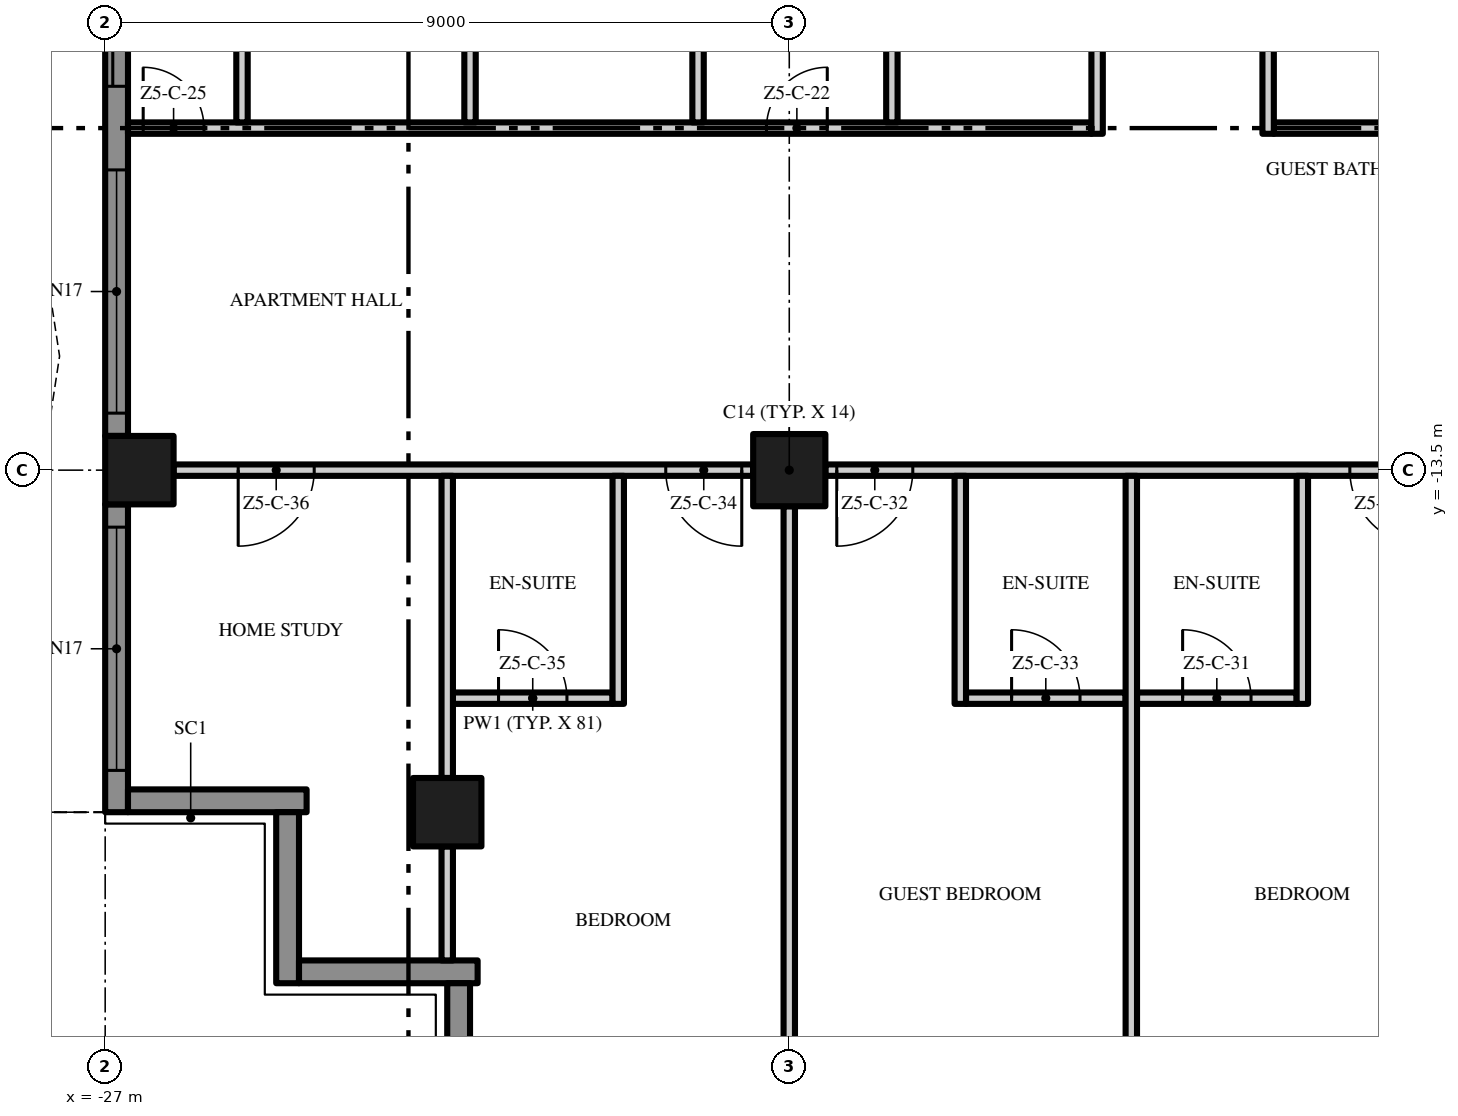
"""IFC4 building model, lengths in metres.
Left out: names, types, materials, properties, quantities, classifications, styles, units other than length and angle.
Written with IfcOpenShell. Run it as: python <this file> out.ifc"""

import sys

from ifc_helpers import new_model, si_unit, direction, frame, frame_2d, origin, origin_2d, place, context, subcontext, project, spatial, polyline, rectangle, outline, extrude, element, fill, save


model = new_model("IFC4")
c1 = context("Model", 3, precision=1e-05, world=origin(), true_north=direction((0.0, 1.0)))
c2 = subcontext(c1, "Body", "Model", "MODEL_VIEW")
j1 = project(units=[si_unit("LENGTHUNIT", "METRE"), si_unit("PLANEANGLEUNIT", "RADIAN")], contexts=[c1])
p1 = place(None, origin())
s1 = spatial("IfcSite", under=j1, at=p1, CompositionType="ELEMENT")
p2 = place(p1, origin())
s2 = spatial("IfcBuilding", under=s1, at=p2, CompositionType="ELEMENT")
p3 = place(p2, frame((0.0, 0.0, 265.4)))
s3 = spatial("IfcBuildingStorey", under=s2, at=p3, CompositionType="ELEMENT", Elevation=265.4)
p4 = place(p3, frame((-18.0, -13.5, 0.0), z_axis=(0.0, 0.0, 1.0), x_axis=(1.0, 0.0, 0.0)))
e1 = element("IfcColumn", 1, at=p4, inside=s3, PredefinedType="COLUMN", context=c2, shape_type="SweptSolid", body=[
    extrude(rectangle(XDim=0.95, YDim=0.95, at=origin_2d()), origin(), (0.0, 0.0, 1.0), 3.5),
])
for number, where, z_axis, x_axis in (
    (2, (-26.55, -13.5, 0.0), (0.0, 0.0, 1.0), (1.0, 0.0, 0.0)),
    (3, (-22.5, -18.0, 0.0), (0.0, 0.0, 1.0), (1.0, 0.0, 0.0)),
):
    element("IfcColumn", number, at=place(p3, frame(where, z_axis=z_axis, x_axis=x_axis)), inside=s3, PredefinedType="COLUMN", context=c2, shape_type="SweptSolid", body=[
        extrude(rectangle(XDim=0.9, YDim=0.9, at=origin_2d()), origin(), (0.0, 0.0, 1.0), 3.5),
    ])
p5 = place(p3, frame((-26.85, -13.05, 0.0), z_axis=(0.0, 0.0, 1.0), x_axis=(0.0, 1.0, 0.0)))
e4 = element("IfcWall", 4, at=p5, inside=s3, PredefinedType="SOLIDWALL", context=c2, shape_type="SweptSolid", body=[
    extrude(rectangle(XDim=8.1, YDim=0.3, at=frame_2d((4.05, 0.0))), origin(), (0.0, 0.0, 1.0), 3.5),
])
p6 = place(p5, frame((4.6, 0.0, 0.0)))
e5 = element("IfcOpeningElement", 5, at=p6, cuts=e4, PredefinedType="OPENING", context=c2, shape_type="SweptSolid", body=[
    extrude(rectangle(XDim=3.2, YDim=2.4, at=frame_2d((1.6, 1.2))), frame((0.0, 0.16, 0.0), z_axis=(0.0, -1.0, 0.0), x_axis=(1.0, 0.0, 0.0)), (0.0, 0.0, 1.0), 0.32),
])
p7 = place(p5, frame((0.3, 0.0, 0.45)))
e6 = element("IfcOpeningElement", 6, at=p7, cuts=e4, PredefinedType="OPENING", context=c2, shape_type="SweptSolid", body=[
    extrude(rectangle(XDim=3.2, YDim=2.65, at=frame_2d((1.6, 1.325))), frame((0.0, 0.16, 0.0), z_axis=(0.0, -1.0, 0.0), x_axis=(1.0, 0.0, 0.0)), (0.0, 0.0, 1.0), 0.32),
])
p8 = place(p3, frame((-26.85, -18.0, 0.0), z_axis=(0.0, 0.0, 1.0), x_axis=(0.0, 1.0, 0.0)))
e7 = element("IfcWall", 7, at=p8, inside=s3, PredefinedType="SOLIDWALL", context=c2, shape_type="SweptSolid", body=[
    extrude(rectangle(XDim=4.05, YDim=0.3, at=frame_2d((2.025, 0.0))), origin(), (0.0, 0.0, 1.0), 3.5),
])
p9 = place(p8, frame((0.55, 0.0, 0.45)))
e8 = element("IfcOpeningElement", 8, at=p9, cuts=e7, PredefinedType="OPENING", context=c2, shape_type="SweptSolid", body=[
    extrude(rectangle(XDim=3.2, YDim=2.65, at=frame_2d((1.6, 1.325))), frame((0.0, 0.16, 0.0), z_axis=(0.0, -1.0, 0.0), x_axis=(1.0, 0.0, 0.0)), (0.0, 0.0, 1.0), 0.32),
])
p10 = place(p3, frame((-24.35, -17.85, 0.0), z_axis=(0.0, 0.0, 1.0), x_axis=(-1.0, 0.0, 0.0)))
e9 = element("IfcWall", 9, at=p10, inside=s3, PredefinedType="SOLIDWALL", context=c2, shape_type="SweptSolid", body=[
    extrude(rectangle(XDim=2.35, YDim=0.3, at=frame_2d((1.175, 0.0))), origin(), (0.0, 0.0, 1.0), 3.5),
])
p11 = place(p3, frame((-24.6, -20.25, 0.0), z_axis=(0.0, 0.0, 1.0), x_axis=(0.0, 1.0, 0.0)))
e10 = element("IfcWall", 10, at=p11, inside=s3, PredefinedType="SOLIDWALL", context=c2, shape_type="SweptSolid", body=[
    extrude(rectangle(XDim=2.25, YDim=0.3, at=frame_2d((1.125, 0.0))), origin(), (0.0, 0.0, 1.0), 3.5),
])
p12 = place(p3, frame((-22.1, -20.1, 0.0), z_axis=(0.0, 0.0, 1.0), x_axis=(-1.0, 0.0, 0.0)))
e11 = element("IfcWall", 11, at=p12, inside=s3, PredefinedType="SOLIDWALL", context=c2, shape_type="SweptSolid", body=[
    extrude(rectangle(XDim=2.35, YDim=0.3, at=frame_2d((1.175, 0.0))), origin(), (0.0, 0.0, 1.0), 3.5),
])
p13 = place(p3, frame((-22.35, -22.5, 0.0), z_axis=(0.0, 0.0, 1.0), x_axis=(0.0, 1.0, 0.0)))
e12 = element("IfcWall", 12, at=p13, inside=s3, PredefinedType="SOLIDWALL", context=c2, shape_type="SweptSolid", body=[
    extrude(rectangle(XDim=2.25, YDim=0.3, at=frame_2d((1.125, 0.0))), origin(), (0.0, 0.0, 1.0), 3.5),
])
p14 = place(p3, origin())
e13 = element("IfcWall", 13, at=p14, inside=s3, PredefinedType="USERDEFINED", context=c2, shape_type="SweptSolid", body=[
    extrude(outline(polyline([(-27.6, 18.0), (-27.829, 16.5), (-28.429, 15.0), (-29.171, 13.5), (-29.771, 12.0), (-30.0, 10.5), (-29.771, 9.0), (-29.171, 7.5), (-28.429, 6.0), (-27.829, 4.5), (-27.6, 3.0), (-27.829, 1.5), (-28.429, 0.0), (-29.171, -1.5), (-29.771, -3.0), (-30.0, -4.5), (-29.771, -6.0), (-29.171, -7.5), (-28.429, -9.0), (-27.829, -10.5), (-27.6, -12.0), (-27.829, -13.5), (-28.429, -15.0), (-29.171, -16.5), (-29.771, -18.0), (-29.539, -18.093), (-28.942, -16.602), (-28.201, -15.102), (-27.586, -13.566), (-27.347, -12.0), (-27.586, -10.434), (-28.201, -8.898), (-28.942, -7.398), (-29.528, -5.934), (-29.747, -4.5), (-29.528, -3.066), (-28.942, -1.602), (-28.201, -0.102), (-27.586, 1.434), (-27.347, 3.0), (-27.586, 4.566), (-28.201, 6.102), (-28.942, 7.602), (-29.528, 9.066), (-29.747, 10.5), (-29.528, 11.934), (-28.942, 13.398), (-28.201, 14.898), (-27.586, 16.434), (-27.353, 17.962), (-27.6, 18.0)])), origin(), (0.0, 0.0, 1.0), 0.9),
])
p15 = place(p3, frame((-22.425, -16.5, 0.0), z_axis=(0.0, 0.0, 1.0), x_axis=(1.0, 0.0, 0.0)))
e14 = element("IfcWall", 14, at=p15, inside=s3, PredefinedType="PARTITIONING", context=c2, shape_type="SweptSolid", body=[
    extrude(rectangle(XDim=2.1, YDim=0.15, at=frame_2d((1.05, 0.0))), origin(), (0.0, 0.0, 1.0), 3.5),
])
p16 = place(p15, frame((0.6, 0.0, 0.0)))
e15 = element("IfcOpeningElement", 15, at=p16, cuts=e14, PredefinedType="OPENING", context=c2, shape_type="SweptSolid", body=[
    extrude(rectangle(XDim=0.9, YDim=2.1, at=frame_2d((0.45, 1.05))), frame((0.0, 0.085, 0.0), z_axis=(0.0, -1.0, 0.0), x_axis=(1.0, 0.0, 0.0)), (0.0, 0.0, 1.0), 0.17),
])
p17 = place(p3, frame((-15.675, -16.5, 0.0), z_axis=(0.0, 0.0, 1.0), x_axis=(1.0, 0.0, 0.0)))
e16 = element("IfcWall", 16, at=p17, inside=s3, PredefinedType="PARTITIONING", context=c2, shape_type="SweptSolid", body=[
    extrude(rectangle(XDim=2.1, YDim=0.15, at=frame_2d((1.05, 0.0))), origin(), (0.0, 0.0, 1.0), 3.5),
])
p18 = place(p17, frame((0.6, 0.0, 0.0)))
e17 = element("IfcOpeningElement", 17, at=p18, cuts=e16, PredefinedType="OPENING", context=c2, shape_type="SweptSolid", body=[
    extrude(rectangle(XDim=0.9, YDim=2.1, at=frame_2d((0.45, 1.05))), frame((0.0, 0.085, 0.0), z_axis=(0.0, -1.0, 0.0), x_axis=(1.0, 0.0, 0.0)), (0.0, 0.0, 1.0), 0.17),
])
p19 = place(p3, frame((-13.425, -16.5, 0.0), z_axis=(0.0, 0.0, 1.0), x_axis=(1.0, 0.0, 0.0)))
e18 = element("IfcWall", 18, at=p19, inside=s3, PredefinedType="PARTITIONING", context=c2, shape_type="SweptSolid", body=[
    extrude(rectangle(XDim=2.1, YDim=0.15, at=frame_2d((1.05, 0.0))), origin(), (0.0, 0.0, 1.0), 3.5),
])
p20 = place(p19, frame((0.6, 0.0, 0.0)))
e19 = element("IfcOpeningElement", 19, at=p20, cuts=e18, PredefinedType="OPENING", context=c2, shape_type="SweptSolid", body=[
    extrude(rectangle(XDim=0.9, YDim=2.1, at=frame_2d((0.45, 1.05))), frame((0.0, 0.085, 0.0), z_axis=(0.0, -1.0, 0.0), x_axis=(1.0, 0.0, 0.0)), (0.0, 0.0, 1.0), 0.17),
])
p21 = place(p3, frame((-18.475, -13.5, 0.0), z_axis=(0.0, 0.0, 1.0), x_axis=(-1.0, 0.0, 0.0)))
e20 = element("IfcWall", 20, at=p21, inside=s3, PredefinedType="PARTITIONING", context=c2, shape_type="SweptSolid", body=[
    extrude(rectangle(XDim=7.625, YDim=0.15, at=frame_2d((3.812, 0.0))), origin(), (0.0, 0.0, 1.0), 3.5),
])
p22 = place(p21, frame((0.15, 0.0, 0.0)))
e21 = element("IfcOpeningElement", 21, at=p22, cuts=e20, PredefinedType="OPENING", context=c2, shape_type="SweptSolid", body=[
    extrude(rectangle(XDim=1.0, YDim=2.4, at=frame_2d((0.5, 1.2))), frame((0.0, 0.085, 0.0), z_axis=(0.0, -1.0, 0.0), x_axis=(1.0, 0.0, 0.0)), (0.0, 0.0, 1.0), 0.17),
])
p23 = place(p21, frame((5.775, 0.0, 0.0)))
e22 = element("IfcOpeningElement", 22, at=p23, cuts=e20, PredefinedType="OPENING", context=c2, shape_type="SweptSolid", body=[
    extrude(rectangle(XDim=1.0, YDim=2.4, at=frame_2d((0.5, 1.2))), frame((0.0, 0.085, 0.0), z_axis=(0.0, -1.0, 0.0), x_axis=(1.0, 0.0, 0.0)), (0.0, 0.0, 1.0), 0.17),
])
p24 = place(p3, frame((-9.475, -13.5, 0.0), z_axis=(0.0, 0.0, 1.0), x_axis=(-1.0, 0.0, 0.0)))
e23 = element("IfcWall", 23, at=p24, inside=s3, PredefinedType="PARTITIONING", context=c2, shape_type="SweptSolid", body=[
    extrude(rectangle(XDim=8.05, YDim=0.15, at=frame_2d((4.025, 0.0))), origin(), (0.0, 0.0, 1.0), 3.5),
])
p25 = place(p24, frame((0.15, 0.0, 0.0)))
e24 = element("IfcOpeningElement", 24, at=p25, cuts=e23, PredefinedType="OPENING", context=c2, shape_type="SweptSolid", body=[
    extrude(rectangle(XDim=1.0, YDim=2.4, at=frame_2d((0.5, 1.2))), frame((0.0, 0.085, 0.0), z_axis=(0.0, -1.0, 0.0), x_axis=(1.0, 0.0, 0.0)), (0.0, 0.0, 1.0), 0.17),
])
p26 = place(p24, frame((6.9, 0.0, 0.0)))
e25 = element("IfcOpeningElement", 25, at=p26, cuts=e23, PredefinedType="OPENING", context=c2, shape_type="SweptSolid", body=[
    extrude(rectangle(XDim=1.0, YDim=2.4, at=frame_2d((0.5, 1.2))), frame((0.0, 0.085, 0.0), z_axis=(0.0, -1.0, 0.0), x_axis=(1.0, 0.0, 0.0)), (0.0, 0.0, 1.0), 0.17),
])
p27 = place(p3, frame((-26.7, -9.0, 0.0), z_axis=(0.0, 0.0, 1.0), x_axis=(1.0, 0.0, 0.0)))
e26 = element("IfcWall", 26, at=p27, inside=s3, PredefinedType="PARTITIONING", context=c2, shape_type="SweptSolid", body=[
    extrude(rectangle(XDim=12.675, YDim=0.15, at=frame_2d((6.338, 0.0))), origin(), (0.0, 0.0, 1.0), 3.5),
])
p28 = place(p27, frame((8.4, 0.0, 0.0)))
e27 = element("IfcOpeningElement", 27, at=p28, cuts=e26, PredefinedType="OPENING", context=c2, shape_type="SweptSolid", body=[
    extrude(rectangle(XDim=0.8, YDim=2.0, at=frame_2d((0.4, 1.0))), frame((0.0, 0.085, 0.0), z_axis=(0.0, -1.0, 0.0), x_axis=(1.0, 0.0, 0.0)), (0.0, 0.0, 1.0), 0.17),
])
p29 = place(p27, frame((0.2, 0.0, 0.0)))
e28 = element("IfcOpeningElement", 28, at=p29, cuts=e26, PredefinedType="OPENING", context=c2, shape_type="SweptSolid", body=[
    extrude(rectangle(XDim=0.8, YDim=2.0, at=frame_2d((0.4, 1.0))), frame((0.0, 0.085, 0.0), z_axis=(0.0, -1.0, 0.0), x_axis=(1.0, 0.0, 0.0)), (0.0, 0.0, 1.0), 0.17),
])
p30 = place(p3, frame((-11.625, -9.0, 0.0), z_axis=(0.0, 0.0, 1.0), x_axis=(1.0, 0.0, 0.0)))
e29 = element("IfcWall", 29, at=p30, inside=s3, PredefinedType="PARTITIONING", context=c2, shape_type="SweptSolid", body=[
    extrude(rectangle(XDim=16.025, YDim=0.15, at=frame_2d((8.012, 0.0))), origin(), (0.0, 0.0, 1.0), 3.5),
])
p31 = place(p30, frame((4.675, 0.0, 0.0)))
e30 = element("IfcOpeningElement", 30, at=p31, cuts=e29, PredefinedType="OPENING", context=c2, shape_type="SweptSolid", body=[
    extrude(rectangle(XDim=1.0, YDim=2.4, at=frame_2d((0.5, 1.2))), frame((0.0, 0.085, 0.0), z_axis=(0.0, -1.0, 0.0), x_axis=(1.0, 0.0, 0.0)), (0.0, 0.0, 1.0), 0.17),
])
p32 = place(p3, frame((-25.2, -8.925, 0.0), z_axis=(0.0, 0.0, 1.0), x_axis=(0.0, 1.0, 0.0)))
e31 = element("IfcWall", 31, at=p32, inside=s3, PredefinedType="PARTITIONING", context=c2, shape_type="SweptSolid", body=[
    extrude(rectangle(XDim=4.35, YDim=0.15, at=frame_2d((2.175, 0.0))), origin(), (0.0, 0.0, 1.0), 3.5),
])
p33 = place(p3, frame((-22.5, -19.95, 0.0), z_axis=(0.0, 0.0, 1.0), x_axis=(0.0, 1.0, 0.0)))
e32 = element("IfcWall", 32, at=p33, inside=s3, PredefinedType="PARTITIONING", context=c2, shape_type="SweptSolid", body=[
    extrude(rectangle(XDim=1.5, YDim=0.15, at=frame_2d((0.75, 0.0))), origin(), (0.0, 0.0, 1.0), 3.5),
])
p34 = place(p3, frame((-22.5, -17.55, 0.0), z_axis=(0.0, 0.0, 1.0), x_axis=(0.0, 1.0, 0.0)))
e33 = element("IfcWall", 33, at=p34, inside=s3, PredefinedType="PARTITIONING", context=c2, shape_type="SweptSolid", body=[
    extrude(rectangle(XDim=3.975, YDim=0.15, at=frame_2d((1.988, 0.0))), origin(), (0.0, 0.0, 1.0), 3.5),
])
p35 = place(p3, frame((-22.2, -8.925, 0.0), z_axis=(0.0, 0.0, 1.0), x_axis=(0.0, 1.0, 0.0)))
e34 = element("IfcWall", 34, at=p35, inside=s3, PredefinedType="PARTITIONING", context=c2, shape_type="SweptSolid", body=[
    extrude(rectangle(XDim=4.35, YDim=0.15, at=frame_2d((2.175, 0.0))), origin(), (0.0, 0.0, 1.0), 3.5),
])
p36 = place(p3, frame((-20.25, -16.575, 0.0), z_axis=(0.0, 0.0, 1.0), x_axis=(0.0, 1.0, 0.0)))
e35 = element("IfcWall", 35, at=p36, inside=s3, PredefinedType="PARTITIONING", context=c2, shape_type="SweptSolid", body=[
    extrude(rectangle(XDim=3.0, YDim=0.15, at=frame_2d((1.5, 0.0))), origin(), (0.0, 0.0, 1.0), 3.5),
])
p37 = place(p3, frame((-19.2, -8.925, 0.0), z_axis=(0.0, 0.0, 1.0), x_axis=(0.0, 1.0, 0.0)))
e36 = element("IfcWall", 36, at=p37, inside=s3, PredefinedType="PARTITIONING", context=c2, shape_type="SweptSolid", body=[
    extrude(rectangle(XDim=4.35, YDim=0.15, at=frame_2d((2.175, 0.0))), origin(), (0.0, 0.0, 1.0), 3.5),
])
p38 = place(p3, frame((-18.0, -21.6, 0.0), z_axis=(0.0, 0.0, 1.0), x_axis=(0.0, 1.0, 0.0)))
e37 = element("IfcWall", 37, at=p38, inside=s3, PredefinedType="PARTITIONING", context=c2, shape_type="SweptSolid", body=[
    extrude(rectangle(XDim=7.625, YDim=0.15, at=frame_2d((3.812, 0.0))), origin(), (0.0, 0.0, 1.0), 3.5),
])
p39 = place(p3, frame((-16.65, -8.925, 0.0), z_axis=(0.0, 0.0, 1.0), x_axis=(0.0, 1.0, 0.0)))
e38 = element("IfcWall", 38, at=p39, inside=s3, PredefinedType="PARTITIONING", context=c2, shape_type="SweptSolid", body=[
    extrude(rectangle(XDim=4.35, YDim=0.15, at=frame_2d((2.175, 0.0))), origin(), (0.0, 0.0, 1.0), 3.5),
])
p40 = place(p3, frame((-15.75, -16.575, 0.0), z_axis=(0.0, 0.0, 1.0), x_axis=(0.0, 1.0, 0.0)))
e39 = element("IfcWall", 39, at=p40, inside=s3, PredefinedType="PARTITIONING", context=c2, shape_type="SweptSolid", body=[
    extrude(rectangle(XDim=3.0, YDim=0.15, at=frame_2d((1.5, 0.0))), origin(), (0.0, 0.0, 1.0), 3.5),
])
p41 = place(p3, frame((-13.95, -9.075, 0.0), z_axis=(0.0, 0.0, 1.0), x_axis=(0.0, 1.0, 0.0)))
e40 = element("IfcWall", 40, at=p41, inside=s3, PredefinedType="PARTITIONING", context=c2, shape_type="SweptSolid", body=[
    extrude(rectangle(XDim=4.65, YDim=0.15, at=frame_2d((2.325, 0.0))), origin(), (0.0, 0.0, 1.0), 3.5),
])
p42 = place(p3, frame((-13.5, -22.2, 0.0), z_axis=(0.0, 0.0, 1.0), x_axis=(0.0, 1.0, 0.0)))
e41 = element("IfcWall", 41, at=p42, inside=s3, PredefinedType="PARTITIONING", context=c2, shape_type="SweptSolid", body=[
    extrude(rectangle(XDim=8.625, YDim=0.15, at=frame_2d((4.312, 0.0))), origin(), (0.0, 0.0, 1.0), 3.5),
])
p43 = place(p3, frame((-11.7, -4.425, 0.0), z_axis=(0.0, 0.0, 1.0), x_axis=(0.0, -1.0, 0.0)))
e42 = element("IfcWall", 42, at=p43, inside=s3, PredefinedType="PARTITIONING", context=c2, shape_type="SweptSolid", body=[
    extrude(rectangle(XDim=4.65, YDim=0.15, at=frame_2d((2.325, 0.0))), origin(), (0.0, 0.0, 1.0), 3.5),
])
p44 = place(p43, frame((1.875, 0.0, 0.0)))
e43 = element("IfcOpeningElement", 43, at=p44, cuts=e42, PredefinedType="OPENING", context=c2, shape_type="SweptSolid", body=[
    extrude(rectangle(XDim=0.9, YDim=2.1, at=frame_2d((0.45, 1.05))), frame((0.0, 0.085, 0.0), z_axis=(0.0, -1.0, 0.0), x_axis=(1.0, 0.0, 0.0)), (0.0, 0.0, 1.0), 0.17),
])
p45 = place(p3, frame((-11.25, -16.575, 0.0), z_axis=(0.0, 0.0, 1.0), x_axis=(0.0, 1.0, 0.0)))
e44 = element("IfcWall", 44, at=p45, inside=s3, PredefinedType="PARTITIONING", context=c2, shape_type="SweptSolid", body=[
    extrude(rectangle(XDim=3.0, YDim=0.15, at=frame_2d((1.5, 0.0))), origin(), (0.0, 0.0, 1.0), 3.5),
])
p46 = place(p6, origin())
e45 = element("IfcDoor", 45, at=p46, inside=s3, OperationType="SINGLE_SWING_LEFT", PredefinedType="DOOR", context=c2, shape_type="SweptSolid", body=[
    extrude(rectangle(XDim=3.2, YDim=2.4, at=frame_2d((1.6, 1.2))), frame((0.0, 0.025, 0.0), z_axis=(0.0, -1.0, 0.0), x_axis=(1.0, 0.0, 0.0)), (0.0, 0.0, 1.0), 0.05),
])
fill(e5, e45)
p47 = place(p7, origin())
e46 = element("IfcWindow", 46, at=p47, inside=s3, PartitioningType="SINGLE_PANEL", PredefinedType="WINDOW", context=c2, shape_type="SweptSolid", body=[
    extrude(rectangle(XDim=3.2, YDim=2.65, at=frame_2d((1.6, 1.325))), frame((0.0, 0.03, 0.0), z_axis=(0.0, -1.0, 0.0), x_axis=(1.0, 0.0, 0.0)), (0.0, 0.0, 1.0), 0.06),
])
fill(e6, e46)
p48 = place(p9, origin())
e47 = element("IfcWindow", 47, at=p48, inside=s3, PartitioningType="SINGLE_PANEL", PredefinedType="WINDOW", context=c2, shape_type="SweptSolid", body=[
    extrude(rectangle(XDim=3.2, YDim=2.65, at=frame_2d((1.6, 1.325))), frame((0.0, 0.03, 0.0), z_axis=(0.0, -1.0, 0.0), x_axis=(1.0, 0.0, 0.0)), (0.0, 0.0, 1.0), 0.06),
])
fill(e8, e47)
p49 = place(p28, origin())
e48 = element("IfcDoor", 48, at=p49, inside=s3, OperationType="SINGLE_SWING_RIGHT", PredefinedType="DOOR", context=c2, shape_type="SweptSolid", body=[
    extrude(rectangle(XDim=0.8, YDim=2.0, at=frame_2d((0.4, 1.0))), frame((0.0, 0.025, 0.0), z_axis=(0.0, -1.0, 0.0), x_axis=(1.0, 0.0, 0.0)), (0.0, 0.0, 1.0), 0.05),
])
fill(e27, e48)
p50 = place(p29, origin())
e49 = element("IfcDoor", 49, at=p50, inside=s3, OperationType="SINGLE_SWING_LEFT", PredefinedType="DOOR", context=c2, shape_type="SweptSolid", body=[
    extrude(rectangle(XDim=0.8, YDim=2.0, at=frame_2d((0.4, 1.0))), frame((0.0, 0.025, 0.0), z_axis=(0.0, -1.0, 0.0), x_axis=(1.0, 0.0, 0.0)), (0.0, 0.0, 1.0), 0.05),
])
fill(e28, e49)
p51 = place(p25, origin())
e50 = element("IfcDoor", 50, at=p51, inside=s3, OperationType="SINGLE_SWING_LEFT", PredefinedType="DOOR", context=c2, shape_type="SweptSolid", body=[
    extrude(rectangle(XDim=1.0, YDim=2.4, at=frame_2d((0.5, 1.2))), frame((0.0, 0.025, 0.0), z_axis=(0.0, -1.0, 0.0), x_axis=(1.0, 0.0, 0.0)), (0.0, 0.0, 1.0), 0.05),
])
fill(e24, e50)
p52 = place(p20, origin())
e51 = element("IfcDoor", 51, at=p52, inside=s3, OperationType="SINGLE_SWING_LEFT", PredefinedType="DOOR", context=c2, shape_type="SweptSolid", body=[
    extrude(rectangle(XDim=0.9, YDim=2.1, at=frame_2d((0.45, 1.05))), frame((0.0, 0.025, 0.0), z_axis=(0.0, -1.0, 0.0), x_axis=(1.0, 0.0, 0.0)), (0.0, 0.0, 1.0), 0.05),
])
fill(e19, e51)
p53 = place(p26, origin())
e52 = element("IfcDoor", 52, at=p53, inside=s3, OperationType="SINGLE_SWING_RIGHT", PredefinedType="DOOR", context=c2, shape_type="SweptSolid", body=[
    extrude(rectangle(XDim=1.0, YDim=2.4, at=frame_2d((0.5, 1.2))), frame((0.0, 0.025, 0.0), z_axis=(0.0, -1.0, 0.0), x_axis=(1.0, 0.0, 0.0)), (0.0, 0.0, 1.0), 0.05),
])
fill(e25, e52)
p54 = place(p18, origin())
e53 = element("IfcDoor", 53, at=p54, inside=s3, OperationType="SINGLE_SWING_LEFT", PredefinedType="DOOR", context=c2, shape_type="SweptSolid", body=[
    extrude(rectangle(XDim=0.9, YDim=2.1, at=frame_2d((0.45, 1.05))), frame((0.0, 0.025, 0.0), z_axis=(0.0, -1.0, 0.0), x_axis=(1.0, 0.0, 0.0)), (0.0, 0.0, 1.0), 0.05),
])
fill(e17, e53)
p55 = place(p22, origin())
e54 = element("IfcDoor", 54, at=p55, inside=s3, OperationType="SINGLE_SWING_LEFT", PredefinedType="DOOR", context=c2, shape_type="SweptSolid", body=[
    extrude(rectangle(XDim=1.0, YDim=2.4, at=frame_2d((0.5, 1.2))), frame((0.0, 0.025, 0.0), z_axis=(0.0, -1.0, 0.0), x_axis=(1.0, 0.0, 0.0)), (0.0, 0.0, 1.0), 0.05),
])
fill(e21, e54)
p56 = place(p16, origin())
e55 = element("IfcDoor", 55, at=p56, inside=s3, OperationType="SINGLE_SWING_LEFT", PredefinedType="DOOR", context=c2, shape_type="SweptSolid", body=[
    extrude(rectangle(XDim=0.9, YDim=2.1, at=frame_2d((0.45, 1.05))), frame((0.0, 0.025, 0.0), z_axis=(0.0, -1.0, 0.0), x_axis=(1.0, 0.0, 0.0)), (0.0, 0.0, 1.0), 0.05),
])
fill(e15, e55)
p57 = place(p23, origin())
e56 = element("IfcDoor", 56, at=p57, inside=s3, OperationType="SINGLE_SWING_RIGHT", PredefinedType="DOOR", context=c2, shape_type="SweptSolid", body=[
    extrude(rectangle(XDim=1.0, YDim=2.4, at=frame_2d((0.5, 1.2))), frame((0.0, 0.025, 0.0), z_axis=(0.0, -1.0, 0.0), x_axis=(1.0, 0.0, 0.0)), (0.0, 0.0, 1.0), 0.05),
])
fill(e22, e56)
save(model, sys.argv[1])
